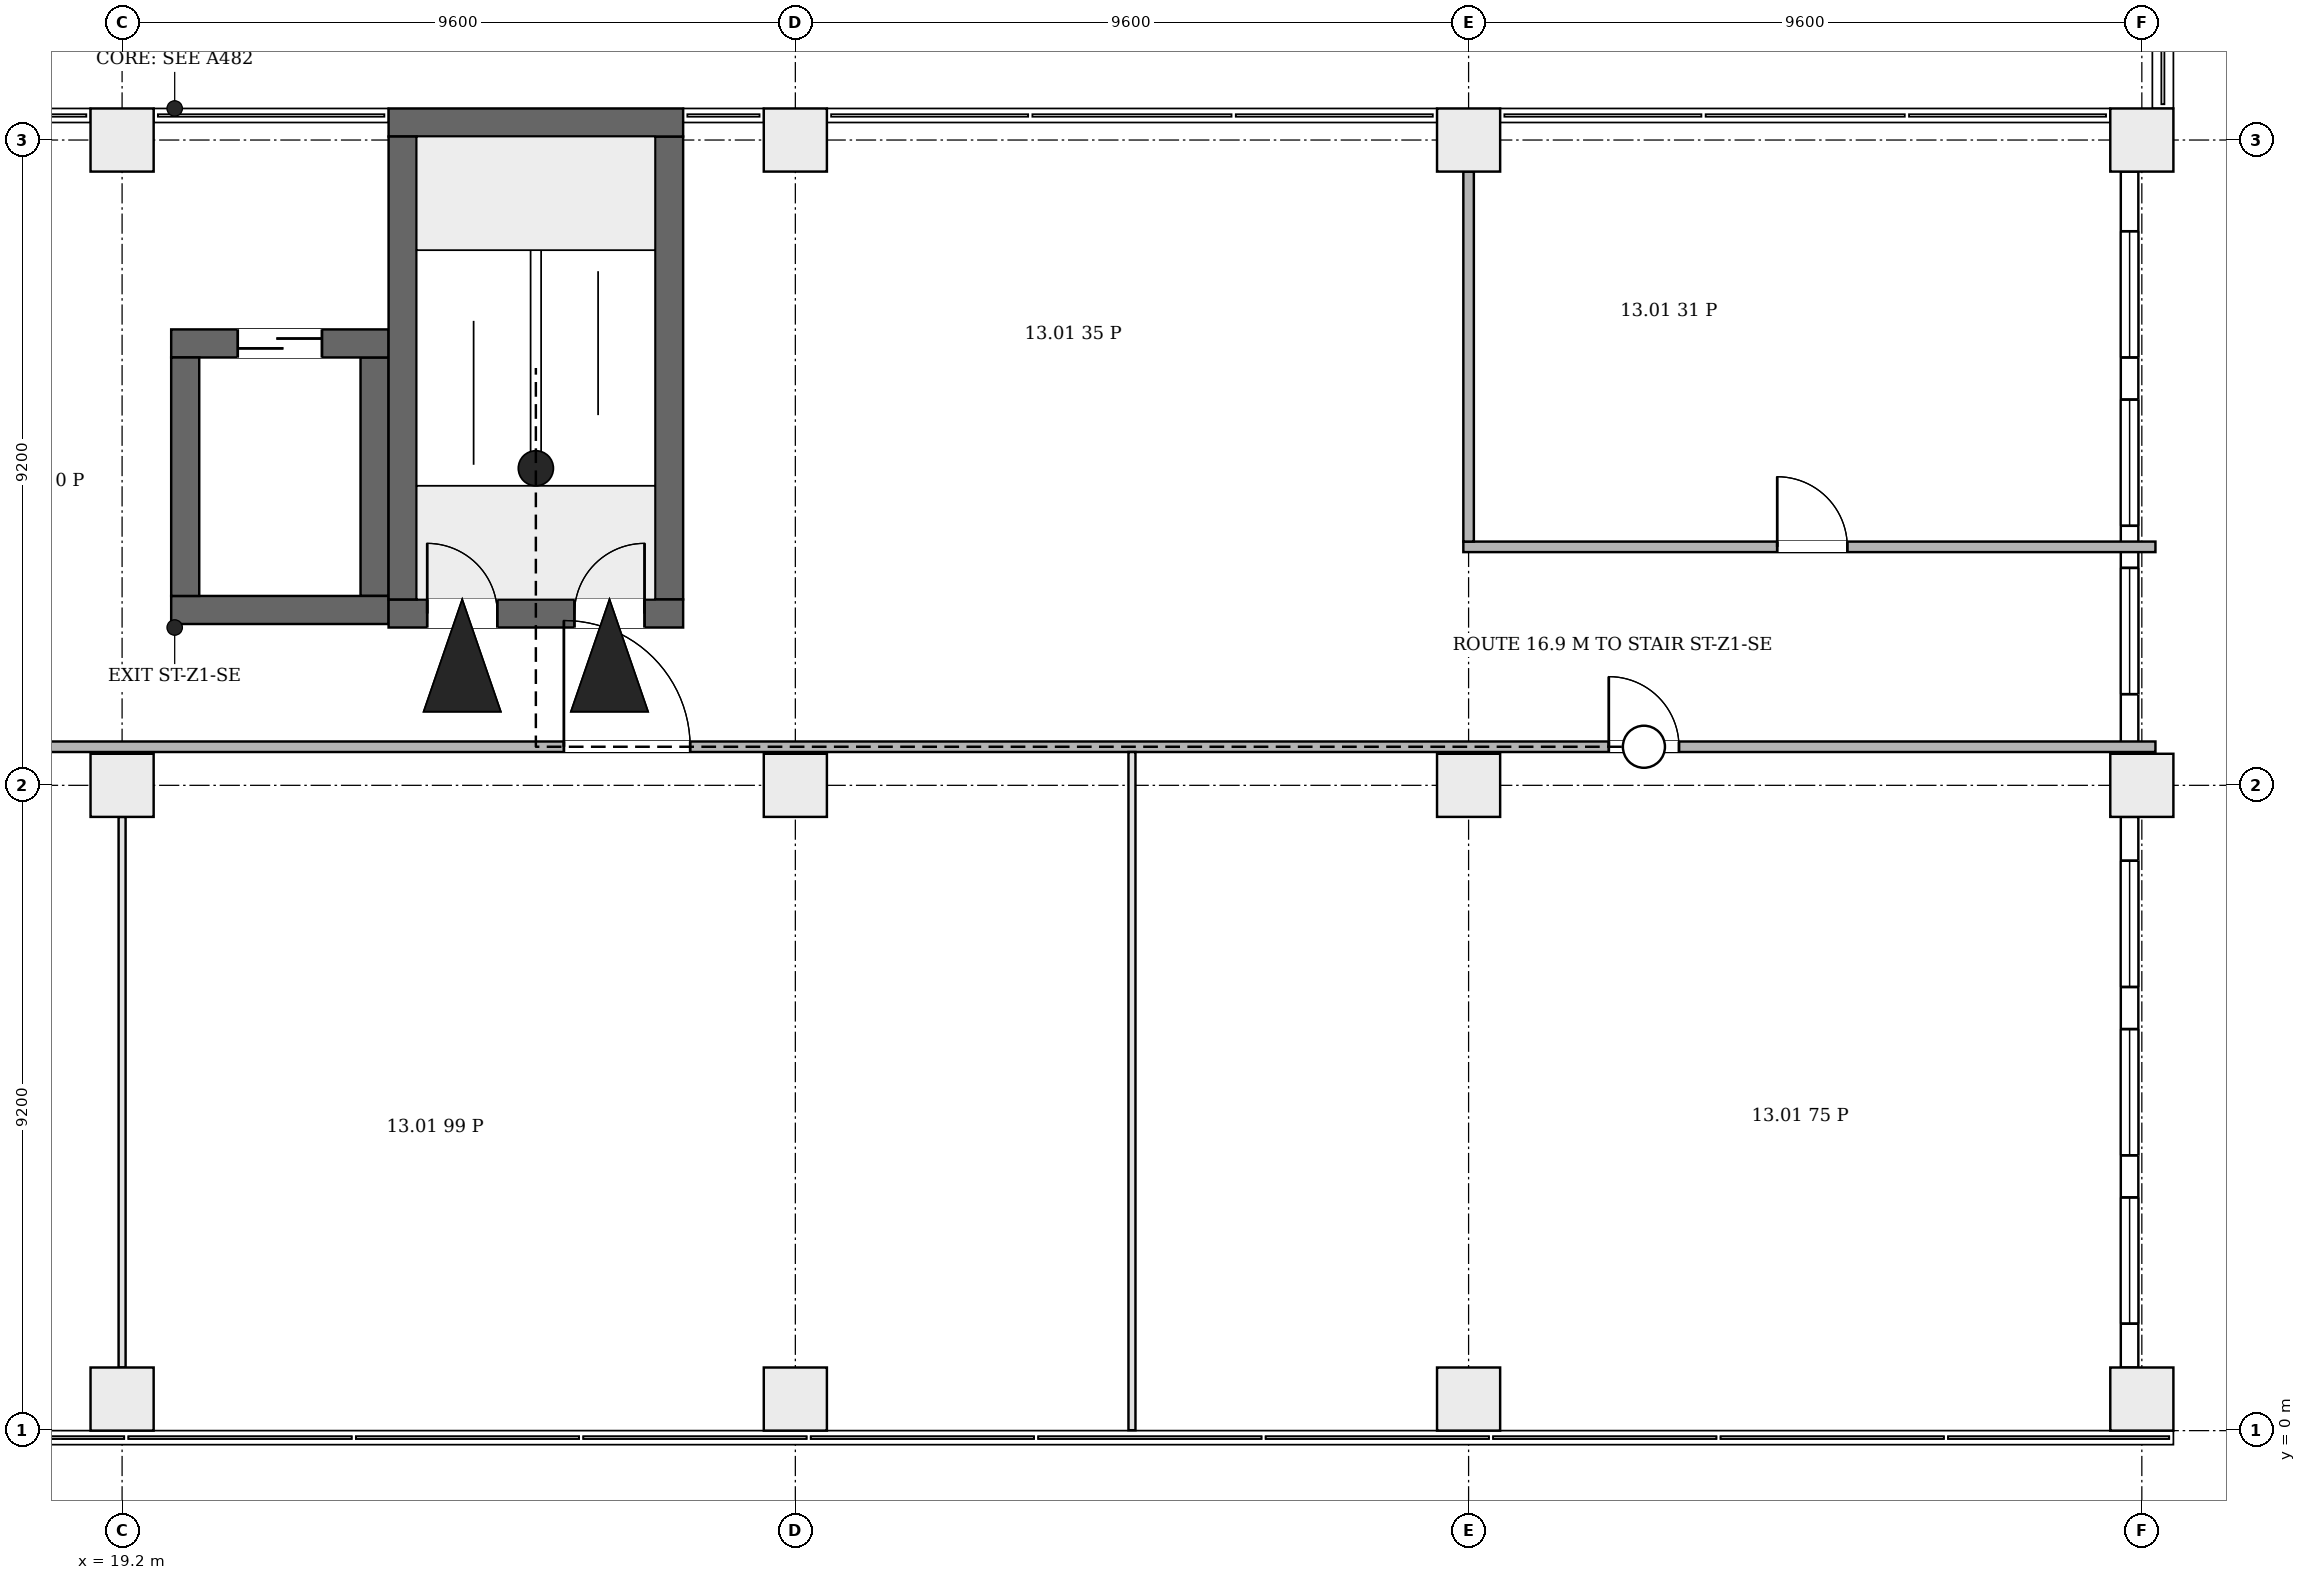
"""IFC4 building model, lengths in metres.
Left out: names, types, materials, properties, quantities, classifications, styles, units other than length and angle.
Written with IfcOpenShell. Run it as: python <this file> out.ifc"""

import sys

from ifc_helpers import new_model, si_unit, direction, frame, frame_2d, origin, origin_2d, place, context, subcontext, project, spatial, rectangle, extrude, element, fill, save


model = new_model("IFC4")
c1 = context("Model", 3, precision=1e-05, world=origin(), true_north=direction((0.0, 1.0)))
c2 = subcontext(c1, "Body", "Model", "MODEL_VIEW")
j1 = project(units=[si_unit("LENGTHUNIT", "METRE"), si_unit("PLANEANGLEUNIT", "RADIAN")], contexts=[c1])
p1 = place(None, origin())
s1 = spatial("IfcSite", under=j1, at=p1, CompositionType="ELEMENT")
p2 = place(p1, origin())
s2 = spatial("IfcBuilding", under=s1, at=p2, CompositionType="ELEMENT")
p3 = place(p2, frame((0.0, 0.0, 65.5)))
s3 = spatial("IfcBuildingStorey", under=s2, at=p3, CompositionType="ELEMENT", Elevation=65.5)
p4 = place(p3, frame((23.0, 11.65, 0.0), z_axis=(0.0, 0.0, 1.0), x_axis=(1.0, 0.0, 0.0)))
e1 = element("IfcWall", 1, at=p4, inside=s3, PredefinedType="SHEAR", context=c2, shape_type="SweptSolid", body=[
    extrude(rectangle(XDim=4.2, YDim=0.4, at=frame_2d((2.1, 0.0))), origin(), (0.0, 0.0, 1.0), 4.2),
])
p5 = place(p4, frame((0.55, 0.0, 0.0)))
e2 = element("IfcOpeningElement", 2, at=p5, cuts=e1, PredefinedType="OPENING", context=c2, shape_type="SweptSolid", body=[
    extrude(rectangle(XDim=1.0, YDim=2.1, at=frame_2d((0.5, 1.05))), frame((0.0, 0.21, 0.0), z_axis=(0.0, -1.0, 0.0), x_axis=(1.0, 0.0, 0.0)), (0.0, 0.0, 1.0), 0.42),
])
p6 = place(p4, frame((2.65, 0.0, 0.0)))
e3 = element("IfcOpeningElement", 3, at=p6, cuts=e1, PredefinedType="OPENING", context=c2, shape_type="SweptSolid", body=[
    extrude(rectangle(XDim=1.0, YDim=2.1, at=frame_2d((0.5, 1.05))), frame((0.0, 0.21, 0.0), z_axis=(0.0, -1.0, 0.0), x_axis=(1.0, 0.0, 0.0)), (0.0, 0.0, 1.0), 0.42),
])
p7 = place(p3, frame((23.0, 18.65, 0.0), z_axis=(0.0, 0.0, 1.0), x_axis=(1.0, 0.0, 0.0)))
e4 = element("IfcWall", 4, at=p7, inside=s3, PredefinedType="SHEAR", context=c2, shape_type="SweptSolid", body=[
    extrude(rectangle(XDim=4.2, YDim=0.4, at=frame_2d((2.1, 0.0))), origin(), (0.0, 0.0, 1.0), 4.2),
])
for number, where, z_axis, x_axis in (
    (5, (23.2, 11.85, 0.0), (0.0, 0.0, 1.0), (0.0, 1.0, 0.0)),
    (6, (27.0, 11.85, 0.0), (0.0, 0.0, 1.0), (0.0, 1.0, 0.0)),
):
    element("IfcWall", number, at=place(p3, frame(where, z_axis=z_axis, x_axis=x_axis)), inside=s3, PredefinedType="SHEAR", context=c2, shape_type="SweptSolid", body=[
        extrude(rectangle(XDim=6.6, YDim=0.4, at=frame_2d((3.3, 0.0))), origin(), (0.0, 0.0, 1.0), 4.2),
    ])
p8 = place(p3, frame((19.9, 11.7, 0.0), z_axis=(0.0, 0.0, 1.0), x_axis=(1.0, 0.0, 0.0)))
e7 = element("IfcWall", 7, at=p8, inside=s3, PredefinedType="SHEAR", context=c2, shape_type="SweptSolid", body=[
    extrude(rectangle(XDim=3.1, YDim=0.4, at=frame_2d((1.55, 0.0))), origin(), (0.0, 0.0, 1.0), 4.2),
])
p9 = place(p3, frame((19.9, 15.5, 0.0), z_axis=(0.0, 0.0, 1.0), x_axis=(1.0, 0.0, 0.0)))
e8 = element("IfcWall", 8, at=p9, inside=s3, PredefinedType="SHEAR", context=c2, shape_type="SweptSolid", body=[
    extrude(rectangle(XDim=3.1, YDim=0.4, at=frame_2d((1.55, 0.0))), origin(), (0.0, 0.0, 1.0), 4.2),
])
p10 = place(p9, frame((0.95, 0.0, 0.0)))
e9 = element("IfcOpeningElement", 9, at=p10, cuts=e8, PredefinedType="OPENING", context=c2, shape_type="SweptSolid", body=[
    extrude(rectangle(XDim=1.2, YDim=2.1, at=frame_2d((0.6, 1.05))), frame((0.0, 0.21, 0.0), z_axis=(0.0, -1.0, 0.0), x_axis=(1.0, 0.0, 0.0)), (0.0, 0.0, 1.0), 0.42),
])
for number, where, z_axis, x_axis in (
    (10, (20.1, 11.9, 0.0), (0.0, 0.0, 1.0), (0.0, 1.0, 0.0)),
    (11, (22.8, 11.9, 0.0), (0.0, 0.0, 1.0), (0.0, 1.0, 0.0)),
):
    element("IfcWall", number, at=place(p3, frame(where, z_axis=z_axis, x_axis=x_axis)), inside=s3, PredefinedType="SHEAR", context=c2, shape_type="SweptSolid", body=[
        extrude(rectangle(XDim=3.4, YDim=0.4, at=frame_2d((1.7, 0.0))), origin(), (0.0, 0.0, 1.0), 4.2),
    ])
for number, where, z_axis, x_axis in (
    (12, (19.2, 0.45, 0.0), (0.0, 0.0, 1.0), (1.0, 0.0, 0.0)),
    (13, (28.8, 0.45, 0.0), (0.0, 0.0, 1.0), (1.0, 0.0, 0.0)),
    (14, (38.4, 0.45, 0.0), (0.0, 0.0, 1.0), (1.0, 0.0, 0.0)),
    (15, (48.0, 0.45, 0.0), (0.0, 0.0, 1.0), (1.0, 0.0, 0.0)),
    (16, (19.2, 9.2, 0.0), (0.0, 0.0, 1.0), (1.0, 0.0, 0.0)),
    (17, (28.8, 9.2, 0.0), (0.0, 0.0, 1.0), (1.0, 0.0, 0.0)),
    (18, (38.4, 9.2, 0.0), (0.0, 0.0, 1.0), (1.0, 0.0, 0.0)),
    (19, (48.0, 9.2, 0.0), (0.0, 0.0, 1.0), (1.0, 0.0, 0.0)),
    (20, (19.2, 18.4, 0.0), (0.0, 0.0, 1.0), (1.0, 0.0, 0.0)),
    (21, (28.8, 18.4, 0.0), (0.0, 0.0, 1.0), (1.0, 0.0, 0.0)),
    (22, (38.4, 18.4, 0.0), (0.0, 0.0, 1.0), (1.0, 0.0, 0.0)),
    (23, (48.0, 18.4, 0.0), (0.0, 0.0, 1.0), (1.0, 0.0, 0.0)),
):
    element("IfcColumn", number, at=place(p3, frame(where, z_axis=z_axis, x_axis=x_axis)), inside=s3, PredefinedType="COLUMN", context=c2, shape_type="SweptSolid", body=[
        extrude(rectangle(XDim=0.9, YDim=0.9, at=origin_2d()), origin(), (0.0, 0.0, 1.0), 4.2),
    ])
p11 = place(p3, frame((47.825, 0.9, 0.0), z_axis=(0.0, 0.0, 1.0), x_axis=(0.0, 1.0, 0.0)))
e24 = element("IfcWall", 24, at=p11, inside=s3, PredefinedType="ELEMENTEDWALL", context=c2, shape_type="SweptSolid", body=[
    extrude(rectangle(XDim=7.85, YDim=0.25, at=frame_2d((3.925, 0.0))), origin(), (0.0, 0.0, 1.0), 3.3),
])
p12 = place(p11, frame((0.625, 0.0, 0.6)))
e25 = element("IfcOpeningElement", 25, at=p12, cuts=e24, PredefinedType="OPENING", context=c2, shape_type="SweptSolid", body=[
    extrude(rectangle(XDim=1.8, YDim=2.6, at=frame_2d((0.9, 1.3))), frame((0.0, 0.135, 0.0), z_axis=(0.0, -1.0, 0.0), x_axis=(1.0, 0.0, 0.0)), (0.0, 0.0, 1.0), 0.27),
])
p13 = place(p11, frame((3.025, 0.0, 0.6)))
e26 = element("IfcOpeningElement", 26, at=p13, cuts=e24, PredefinedType="OPENING", context=c2, shape_type="SweptSolid", body=[
    extrude(rectangle(XDim=1.8, YDim=2.6, at=frame_2d((0.9, 1.3))), frame((0.0, 0.135, 0.0), z_axis=(0.0, -1.0, 0.0), x_axis=(1.0, 0.0, 0.0)), (0.0, 0.0, 1.0), 0.27),
])
p14 = place(p11, frame((5.425, 0.0, 0.6)))
e27 = element("IfcOpeningElement", 27, at=p14, cuts=e24, PredefinedType="OPENING", context=c2, shape_type="SweptSolid", body=[
    extrude(rectangle(XDim=1.8, YDim=2.6, at=frame_2d((0.9, 1.3))), frame((0.0, 0.135, 0.0), z_axis=(0.0, -1.0, 0.0), x_axis=(1.0, 0.0, 0.0)), (0.0, 0.0, 1.0), 0.27),
])
p15 = place(p3, frame((47.825, 9.65, 0.0), z_axis=(0.0, 0.0, 1.0), x_axis=(0.0, 1.0, 0.0)))
e28 = element("IfcWall", 28, at=p15, inside=s3, PredefinedType="ELEMENTEDWALL", context=c2, shape_type="SweptSolid", body=[
    extrude(rectangle(XDim=8.3, YDim=0.25, at=frame_2d((4.15, 0.0))), origin(), (0.0, 0.0, 1.0), 3.3),
])
p16 = place(p15, frame((0.85, 0.0, 0.6)))
e29 = element("IfcOpeningElement", 29, at=p16, cuts=e28, PredefinedType="OPENING", context=c2, shape_type="SweptSolid", body=[
    extrude(rectangle(XDim=1.8, YDim=2.6, at=frame_2d((0.9, 1.3))), frame((0.0, 0.135, 0.0), z_axis=(0.0, -1.0, 0.0), x_axis=(1.0, 0.0, 0.0)), (0.0, 0.0, 1.0), 0.27),
])
p17 = place(p15, frame((3.25, 0.0, 0.6)))
e30 = element("IfcOpeningElement", 30, at=p17, cuts=e28, PredefinedType="OPENING", context=c2, shape_type="SweptSolid", body=[
    extrude(rectangle(XDim=1.8, YDim=2.6, at=frame_2d((0.9, 1.3))), frame((0.0, 0.135, 0.0), z_axis=(0.0, -1.0, 0.0), x_axis=(1.0, 0.0, 0.0)), (0.0, 0.0, 1.0), 0.27),
])
p18 = place(p15, frame((5.65, 0.0, 0.6)))
e31 = element("IfcOpeningElement", 31, at=p18, cuts=e28, PredefinedType="OPENING", context=c2, shape_type="SweptSolid", body=[
    extrude(rectangle(XDim=1.8, YDim=2.6, at=frame_2d((0.9, 1.3))), frame((0.0, 0.135, 0.0), z_axis=(0.0, -1.0, 0.0), x_axis=(1.0, 0.0, 0.0)), (0.0, 0.0, 1.0), 0.27),
])
p19 = place(p3, frame((4.325, 9.75, 0.0), z_axis=(0.0, 0.0, 1.0), x_axis=(1.0, 0.0, 0.0)))
e32 = element("IfcWall", 32, at=p19, inside=s3, PredefinedType="PARTITIONING", context=c2, shape_type="SweptSolid", body=[
    extrude(rectangle(XDim=43.869, YDim=0.15, at=frame_2d((21.935, 0.0))), origin(), (0.0, 0.0, 1.0), 3.9),
])
p20 = place(p19, frame((6.575, 0.0, 0.0)))
e33 = element("IfcOpeningElement", 33, at=p20, cuts=e32, PredefinedType="OPENING", context=c2, shape_type="SweptSolid", body=[
    extrude(rectangle(XDim=1.8, YDim=2.1, at=frame_2d((0.9, 1.05))), frame((0.0, 0.085, 0.0), z_axis=(0.0, -1.0, 0.0), x_axis=(1.0, 0.0, 0.0)), (0.0, 0.0, 1.0), 0.17),
])
p21 = place(p19, frame((21.175, 0.0, 0.0)))
e34 = element("IfcOpeningElement", 34, at=p21, cuts=e32, PredefinedType="OPENING", context=c2, shape_type="SweptSolid", body=[
    extrude(rectangle(XDim=1.8, YDim=2.1, at=frame_2d((0.9, 1.05))), frame((0.0, 0.085, 0.0), z_axis=(0.0, -1.0, 0.0), x_axis=(1.0, 0.0, 0.0)), (0.0, 0.0, 1.0), 0.17),
])
p22 = place(p19, frame((36.075, 0.0, 0.0)))
e35 = element("IfcOpeningElement", 35, at=p22, cuts=e32, PredefinedType="OPENING", context=c2, shape_type="SweptSolid", body=[
    extrude(rectangle(XDim=1.0, YDim=2.1, at=frame_2d((0.5, 1.05))), frame((0.0, 0.085, 0.0), z_axis=(0.0, -1.0, 0.0), x_axis=(1.0, 0.0, 0.0)), (0.0, 0.0, 1.0), 0.17),
])
p23 = place(p3, frame((19.2, 0.9, 0.0), z_axis=(0.0, 0.0, 1.0), x_axis=(0.0, 1.0, 0.0)))
e36 = element("IfcWall", 36, at=p23, inside=s3, PredefinedType="PARTITIONING", context=c2, shape_type="SweptSolid", body=[
    extrude(rectangle(XDim=7.85, YDim=0.1, at=frame_2d((3.925, 0.0))), origin(), (0.0, 0.0, 1.0), 3.9),
])
p24 = place(p3, frame((33.6, 0.006, 0.0), z_axis=(0.0, 0.0, 1.0), x_axis=(0.0, 1.0, 0.0)))
e37 = element("IfcWall", 37, at=p24, inside=s3, PredefinedType="PARTITIONING", context=c2, shape_type="SweptSolid", body=[
    extrude(rectangle(XDim=9.669, YDim=0.1, at=frame_2d((4.834, 0.0))), origin(), (0.0, 0.0, 1.0), 3.9),
])
p25 = place(p3, frame((38.325, 12.6, 0.0), z_axis=(0.0, 0.0, 1.0), x_axis=(1.0, 0.0, 0.0)))
e38 = element("IfcWall", 38, at=p25, inside=s3, PredefinedType="PARTITIONING", context=c2, shape_type="SweptSolid", body=[
    extrude(rectangle(XDim=9.869, YDim=0.15, at=frame_2d((4.935, 0.0))), origin(), (0.0, 0.0, 1.0), 3.9),
])
p26 = place(p25, frame((4.475, 0.0, 0.0)))
e39 = element("IfcOpeningElement", 39, at=p26, cuts=e38, PredefinedType="OPENING", context=c2, shape_type="SweptSolid", body=[
    extrude(rectangle(XDim=1.0, YDim=2.1, at=frame_2d((0.5, 1.05))), frame((0.0, 0.085, 0.0), z_axis=(0.0, -1.0, 0.0), x_axis=(1.0, 0.0, 0.0)), (0.0, 0.0, 1.0), 0.17),
])
p27 = place(p3, frame((38.4, 12.675, 0.0), z_axis=(0.0, 0.0, 1.0), x_axis=(0.0, 1.0, 0.0)))
e40 = element("IfcWall", 40, at=p27, inside=s3, PredefinedType="PARTITIONING", context=c2, shape_type="SweptSolid", body=[
    extrude(rectangle(XDim=5.275, YDim=0.15, at=frame_2d((2.637, 0.0))), origin(), (0.0, 0.0, 1.0), 3.9),
])
p28 = place(p12, origin())
e41 = element("IfcWindow", 41, at=p28, inside=s3, PartitioningType="SINGLE_PANEL", PredefinedType="WINDOW", context=c2, shape_type="SweptSolid", body=[
    extrude(rectangle(XDim=1.8, YDim=2.6, at=frame_2d((0.9, 1.3))), frame((0.0, 0.03, 0.0), z_axis=(0.0, -1.0, 0.0), x_axis=(1.0, 0.0, 0.0)), (0.0, 0.0, 1.0), 0.06),
])
fill(e25, e41)
p29 = place(p13, origin())
e42 = element("IfcWindow", 42, at=p29, inside=s3, PartitioningType="SINGLE_PANEL", PredefinedType="WINDOW", context=c2, shape_type="SweptSolid", body=[
    extrude(rectangle(XDim=1.8, YDim=2.6, at=frame_2d((0.9, 1.3))), frame((0.0, 0.03, 0.0), z_axis=(0.0, -1.0, 0.0), x_axis=(1.0, 0.0, 0.0)), (0.0, 0.0, 1.0), 0.06),
])
fill(e26, e42)
p30 = place(p14, origin())
e43 = element("IfcWindow", 43, at=p30, inside=s3, PartitioningType="SINGLE_PANEL", PredefinedType="WINDOW", context=c2, shape_type="SweptSolid", body=[
    extrude(rectangle(XDim=1.8, YDim=2.6, at=frame_2d((0.9, 1.3))), frame((0.0, 0.03, 0.0), z_axis=(0.0, -1.0, 0.0), x_axis=(1.0, 0.0, 0.0)), (0.0, 0.0, 1.0), 0.06),
])
fill(e27, e43)
p31 = place(p16, origin())
e44 = element("IfcWindow", 44, at=p31, inside=s3, PartitioningType="SINGLE_PANEL", PredefinedType="WINDOW", context=c2, shape_type="SweptSolid", body=[
    extrude(rectangle(XDim=1.8, YDim=2.6, at=frame_2d((0.9, 1.3))), frame((0.0, 0.03, 0.0), z_axis=(0.0, -1.0, 0.0), x_axis=(1.0, 0.0, 0.0)), (0.0, 0.0, 1.0), 0.06),
])
fill(e29, e44)
p32 = place(p17, origin())
e45 = element("IfcWindow", 45, at=p32, inside=s3, PartitioningType="SINGLE_PANEL", PredefinedType="WINDOW", context=c2, shape_type="SweptSolid", body=[
    extrude(rectangle(XDim=1.8, YDim=2.6, at=frame_2d((0.9, 1.3))), frame((0.0, 0.03, 0.0), z_axis=(0.0, -1.0, 0.0), x_axis=(1.0, 0.0, 0.0)), (0.0, 0.0, 1.0), 0.06),
])
fill(e30, e45)
p33 = place(p18, origin())
e46 = element("IfcWindow", 46, at=p33, inside=s3, PartitioningType="SINGLE_PANEL", PredefinedType="WINDOW", context=c2, shape_type="SweptSolid", body=[
    extrude(rectangle(XDim=1.8, YDim=2.6, at=frame_2d((0.9, 1.3))), frame((0.0, 0.03, 0.0), z_axis=(0.0, -1.0, 0.0), x_axis=(1.0, 0.0, 0.0)), (0.0, 0.0, 1.0), 0.06),
])
fill(e31, e46)
p34 = place(p5, origin())
e47 = element("IfcDoor", 47, at=p34, inside=s3, OperationType="SINGLE_SWING_RIGHT", PredefinedType="DOOR", context=c2, shape_type="SweptSolid", body=[
    extrude(rectangle(XDim=1.0, YDim=2.1, at=frame_2d((0.5, 1.05))), frame((0.0, 0.025, 0.0), z_axis=(0.0, -1.0, 0.0), x_axis=(1.0, 0.0, 0.0)), (0.0, 0.0, 1.0), 0.05),
])
fill(e2, e47)
p35 = place(p6, origin())
e48 = element("IfcDoor", 48, at=p35, inside=s3, OperationType="SINGLE_SWING_LEFT", PredefinedType="DOOR", context=c2, shape_type="SweptSolid", body=[
    extrude(rectangle(XDim=1.0, YDim=2.1, at=frame_2d((0.5, 1.05))), frame((0.0, 0.025, 0.0), z_axis=(0.0, -1.0, 0.0), x_axis=(1.0, 0.0, 0.0)), (0.0, 0.0, 1.0), 0.05),
])
fill(e3, e48)
p36 = place(p10, origin())
e49 = element("IfcDoor", 49, at=p36, inside=s3, OperationType="DOUBLE_DOOR_SLIDING", PredefinedType="DOOR", context=c2, shape_type="SweptSolid", body=[
    extrude(rectangle(XDim=1.2, YDim=2.1, at=frame_2d((0.6, 1.05))), frame((0.0, 0.025, 0.0), z_axis=(0.0, -1.0, 0.0), x_axis=(1.0, 0.0, 0.0)), (0.0, 0.0, 1.0), 0.05),
])
fill(e9, e49)
p37 = place(p21, origin())
e50 = element("IfcDoor", 50, at=p37, inside=s3, OperationType="DOUBLE_DOOR_SINGLE_SWING", PredefinedType="DOOR", context=c2, shape_type="SweptSolid", body=[
    extrude(rectangle(XDim=1.8, YDim=2.1, at=frame_2d((0.9, 1.05))), frame((0.0, 0.025, 0.0), z_axis=(0.0, -1.0, 0.0), x_axis=(1.0, 0.0, 0.0)), (0.0, 0.0, 1.0), 0.05),
])
fill(e34, e50)
p38 = place(p22, origin())
e51 = element("IfcDoor", 51, at=p38, inside=s3, OperationType="SINGLE_SWING_LEFT", PredefinedType="DOOR", context=c2, shape_type="SweptSolid", body=[
    extrude(rectangle(XDim=1.0, YDim=2.1, at=frame_2d((0.5, 1.05))), frame((0.0, 0.025, 0.0), z_axis=(0.0, -1.0, 0.0), x_axis=(1.0, 0.0, 0.0)), (0.0, 0.0, 1.0), 0.05),
])
fill(e35, e51)
p39 = place(p26, origin())
e52 = element("IfcDoor", 52, at=p39, inside=s3, OperationType="SINGLE_SWING_RIGHT", PredefinedType="DOOR", context=c2, shape_type="SweptSolid", body=[
    extrude(rectangle(XDim=1.0, YDim=2.1, at=frame_2d((0.5, 1.05))), frame((0.0, 0.025, 0.0), z_axis=(0.0, -1.0, 0.0), x_axis=(1.0, 0.0, 0.0)), (0.0, 0.0, 1.0), 0.05),
])
fill(e39, e52)
save(model, sys.argv[1])
